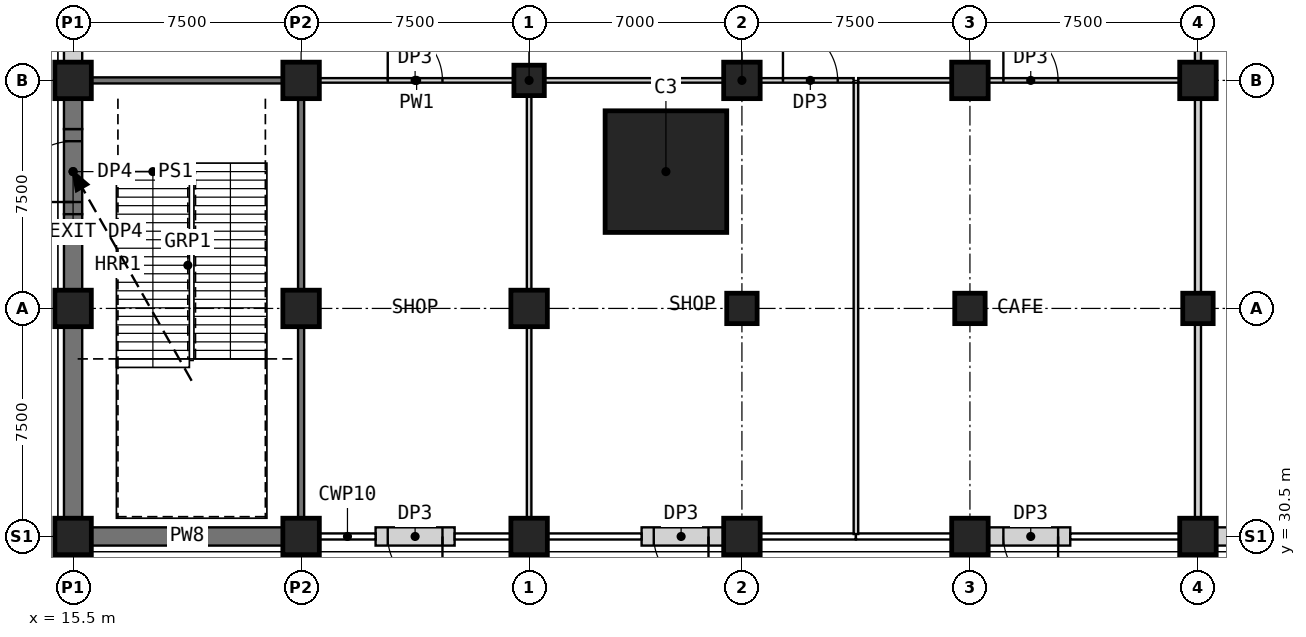
"""IFC4 building model, lengths in metres.
Left out: names, types, materials, properties, quantities, classifications, styles, units other than length and angle.
Written with IfcOpenShell. Run it as: python <this file> out.ifc"""

import sys

from ifc_helpers import new_model, si_unit, direction, frame, frame_2d, origin, origin_2d, place, context, subcontext, project, spatial, rectangle, extrude, element, fill, save


model = new_model("IFC4")
c1 = context("Model", 3, precision=1e-05, world=origin(), true_north=direction((0.0, 1.0)))
c2 = subcontext(c1, "Body", "Model", "MODEL_VIEW")
j1 = project(units=[si_unit("LENGTHUNIT", "METRE"), si_unit("PLANEANGLEUNIT", "RADIAN")], contexts=[c1])
p1 = place(None, origin())
s1 = spatial("IfcSite", under=j1, at=p1, CompositionType="ELEMENT")
p2 = place(p1, origin())
s2 = spatial("IfcBuilding", under=s1, at=p2, CompositionType="ELEMENT")
p3 = place(p2, origin())
s3 = spatial("IfcBuildingStorey", under=s2, at=p3, CompositionType="ELEMENT", Elevation=0.0)
for number, where, z_axis, x_axis in (
    (1, (30.5, 45.5, 0.0), (0.0, 0.0, 1.0), (1.0, 0.0, 0.0)),
    (2, (37.5, 38.0, 0.0), (0.0, 0.0, 1.0), (1.0, 0.0, 0.0)),
):
    element("IfcColumn", number, at=place(p3, frame(where, z_axis=z_axis, x_axis=x_axis)), inside=s3, PredefinedType="COLUMN", context=c2, shape_type="SweptSolid", body=[
        extrude(rectangle(XDim=1.0, YDim=1.0, at=origin_2d()), origin(), (0.0, 0.0, 1.0), 8.0),
    ])
p4 = place(p3, frame((37.5, 45.5, 0.0), z_axis=(0.0, 0.0, 1.0), x_axis=(1.0, 0.0, 0.0)))
e3 = element("IfcColumn", 3, at=p4, inside=s3, PredefinedType="COLUMN", context=c2, shape_type="SweptSolid", body=[
    extrude(rectangle(XDim=1.2, YDim=1.2, at=origin_2d()), origin(), (0.0, 0.0, 1.0), 8.0),
])
p5 = place(p3, frame((45.0, 38.0, 0.0), z_axis=(0.0, 0.0, 1.0), x_axis=(1.0, 0.0, 0.0)))
e4 = element("IfcColumn", 4, at=p5, inside=s3, PredefinedType="COLUMN", context=c2, shape_type="SweptSolid", body=[
    extrude(rectangle(XDim=1.0, YDim=1.0, at=origin_2d()), origin(), (0.0, 0.0, 1.0), 8.0),
])
p6 = place(p3, frame((45.0, 45.5, 0.0), z_axis=(0.0, 0.0, 1.0), x_axis=(1.0, 0.0, 0.0)))
e5 = element("IfcColumn", 5, at=p6, inside=s3, PredefinedType="COLUMN", context=c2, shape_type="SweptSolid", body=[
    extrude(rectangle(XDim=1.2, YDim=1.2, at=origin_2d()), origin(), (0.0, 0.0, 1.0), 8.0),
])
p7 = place(p3, frame((52.5, 38.0, 0.0), z_axis=(0.0, 0.0, 1.0), x_axis=(1.0, 0.0, 0.0)))
e6 = element("IfcColumn", 6, at=p7, inside=s3, PredefinedType="COLUMN", context=c2, shape_type="SweptSolid", body=[
    extrude(rectangle(XDim=1.0, YDim=1.0, at=origin_2d()), origin(), (0.0, 0.0, 1.0), 8.0),
])
p8 = place(p3, frame((52.5, 45.5, 0.0), z_axis=(0.0, 0.0, 1.0), x_axis=(1.0, 0.0, 0.0)))
e7 = element("IfcColumn", 7, at=p8, inside=s3, PredefinedType="COLUMN", context=c2, shape_type="SweptSolid", body=[
    extrude(rectangle(XDim=1.2, YDim=1.2, at=origin_2d()), origin(), (0.0, 0.0, 1.0), 8.0),
])
p9 = place(p3, frame((35.0, 42.5, 0.0), z_axis=(0.0, 0.0, 1.0), x_axis=(1.0, 0.0, 0.0)))
e8 = element("IfcColumn", 8, at=p9, inside=s3, PredefinedType="COLUMN", context=c2, shape_type="SweptSolid", body=[
    extrude(rectangle(XDim=4.0, YDim=4.0, at=origin_2d()), origin(), (0.0, 0.0, 1.0), 8.0),
])
for number, where, z_axis, x_axis in (
    (9, (15.5, 30.5, 0.0), (0.0, 0.0, 1.0), (1.0, 0.0, 0.0)),
    (10, (15.5, 38.0, 0.0), (0.0, 0.0, 1.0), (1.0, 0.0, 0.0)),
    (11, (15.5, 45.5, 0.0), (0.0, 0.0, 1.0), (1.0, 0.0, 0.0)),
    (12, (23.0, 30.5, 0.0), (0.0, 0.0, 1.0), (1.0, 0.0, 0.0)),
    (13, (23.0, 38.0, 0.0), (0.0, 0.0, 1.0), (1.0, 0.0, 0.0)),
    (14, (23.0, 45.5, 0.0), (0.0, 0.0, 1.0), (1.0, 0.0, 0.0)),
    (15, (30.5, 30.5, 0.0), (0.0, 0.0, 1.0), (1.0, 0.0, 0.0)),
    (16, (30.5, 38.0, 0.0), (0.0, 0.0, 1.0), (1.0, 0.0, 0.0)),
    (17, (37.5, 30.5, 0.0), (0.0, 0.0, 1.0), (1.0, 0.0, 0.0)),
    (18, (45.0, 30.5, 0.0), (0.0, 0.0, 1.0), (1.0, 0.0, 0.0)),
    (19, (52.5, 30.5, 0.0), (0.0, 0.0, 1.0), (1.0, 0.0, 0.0)),
):
    element("IfcColumn", number, at=place(p3, frame(where, z_axis=z_axis, x_axis=x_axis)), inside=s3, PredefinedType="COLUMN", context=c2, shape_type="SweptSolid", body=[
        extrude(rectangle(XDim=1.2, YDim=1.2, at=origin_2d()), origin(), (0.0, 0.0, 1.0), 8.0),
    ])
p10 = place(p3, frame((16.1, 30.5, 0.0), z_axis=(0.0, 0.0, 1.0), x_axis=(1.0, 0.0, 0.0)))
e20 = element("IfcWall", 20, at=p10, inside=s3, PredefinedType="PARTITIONING", context=c2, shape_type="SweptSolid", body=[
    extrude(rectangle(XDim=6.3, YDim=0.6, at=frame_2d((3.15, 0.0))), origin(), (0.0, 0.0, 1.0), 7.1),
])
p11 = place(p3, frame((28.05, 30.5, 0.0), z_axis=(0.0, 0.0, 1.0), x_axis=(-1.0, 0.0, 0.0)))
e21 = element("IfcWall", 21, at=p11, inside=s3, PredefinedType="PARTITIONING", context=c2, shape_type="SweptSolid", body=[
    extrude(rectangle(XDim=2.6, YDim=0.6, at=frame_2d((1.3, 0.0))), origin(), (0.0, 0.0, 1.0), 7.1),
])
p12 = place(p11, frame((0.4, 0.0, 0.0)))
e22 = element("IfcOpeningElement", 22, at=p12, cuts=e21, PredefinedType="OPENING", context=c2, shape_type="SweptSolid", body=[
    extrude(rectangle(XDim=1.8, YDim=2.4, at=frame_2d((0.9, 1.2))), frame((0.0, 0.31, 0.0), z_axis=(0.0, -1.0, 0.0), x_axis=(1.0, 0.0, 0.0)), (0.0, 0.0, 1.0), 0.62),
])
p13 = place(p3, frame((36.9, 30.5, 0.0), z_axis=(0.0, 0.0, 1.0), x_axis=(-1.0, 0.0, 0.0)))
e23 = element("IfcWall", 23, at=p13, inside=s3, PredefinedType="PARTITIONING", context=c2, shape_type="SweptSolid", body=[
    extrude(rectangle(XDim=2.7, YDim=0.6, at=frame_2d((1.35, 0.0))), origin(), (0.0, 0.0, 1.0), 7.1),
])
p14 = place(p13, frame((0.5, 0.0, 0.0)))
e24 = element("IfcOpeningElement", 24, at=p14, cuts=e23, PredefinedType="OPENING", context=c2, shape_type="SweptSolid", body=[
    extrude(rectangle(XDim=1.8, YDim=2.4, at=frame_2d((0.9, 1.2))), frame((0.0, 0.31, 0.0), z_axis=(0.0, -1.0, 0.0), x_axis=(1.0, 0.0, 0.0)), (0.0, 0.0, 1.0), 0.62),
])
p15 = place(p3, frame((48.3, 30.5, 0.0), z_axis=(0.0, 0.0, 1.0), x_axis=(-1.0, 0.0, 0.0)))
e25 = element("IfcWall", 25, at=p15, inside=s3, PredefinedType="PARTITIONING", context=c2, shape_type="SweptSolid", body=[
    extrude(rectangle(XDim=2.7, YDim=0.6, at=frame_2d((1.35, 0.0))), origin(), (0.0, 0.0, 1.0), 7.1),
])
p16 = place(p15, frame((0.4, 0.0, 0.0)))
e26 = element("IfcOpeningElement", 26, at=p16, cuts=e25, PredefinedType="OPENING", context=c2, shape_type="SweptSolid", body=[
    extrude(rectangle(XDim=1.8, YDim=2.4, at=frame_2d((0.9, 1.2))), frame((0.0, 0.31, 0.0), z_axis=(0.0, -1.0, 0.0), x_axis=(1.0, 0.0, 0.0)), (0.0, 0.0, 1.0), 0.62),
])
p17 = place(p3, frame((53.1, 30.5, 0.0), z_axis=(0.0, 0.0, 1.0), x_axis=(1.0, 0.0, 0.0)))
e27 = element("IfcWall", 27, at=p17, inside=s3, PredefinedType="PARTITIONING", context=c2, shape_type="SweptSolid", body=[
    extrude(rectangle(XDim=1.85, YDim=0.6, at=frame_2d((0.925, 0.0))), origin(), (0.0, 0.0, 1.0), 7.1),
])
p18 = place(p3, frame((16.1, 45.5, 0.0), z_axis=(0.0, 0.0, 1.0), x_axis=(1.0, 0.0, 0.0)))
e28 = element("IfcWall", 28, at=p18, inside=s3, PredefinedType="SHEAR", context=c2, shape_type="SweptSolid", body=[
    extrude(rectangle(XDim=6.3, YDim=0.2, at=frame_2d((3.15, 0.0))), origin(), (0.0, 0.0, 1.0), 7.7),
])
p19 = place(p3, frame((23.6, 45.5, 0.0), z_axis=(0.0, 0.0, 1.0), x_axis=(1.0, 0.0, 0.0)))
e29 = element("IfcWall", 29, at=p19, inside=s3, PredefinedType="PARTITIONING", context=c2, shape_type="SweptSolid", body=[
    extrude(rectangle(XDim=6.4, YDim=0.15, at=frame_2d((3.2, 0.0))), origin(), (0.0, 0.0, 1.0), 7.7),
])
p20 = place(p19, frame((2.25, 0.0, 0.0)))
e30 = element("IfcOpeningElement", 30, at=p20, cuts=e29, PredefinedType="OPENING", context=c2, shape_type="SweptSolid", body=[
    extrude(rectangle(XDim=1.8, YDim=2.4, at=frame_2d((0.9, 1.2))), frame((0.0, 0.085, 0.0), z_axis=(0.0, -1.0, 0.0), x_axis=(1.0, 0.0, 0.0)), (0.0, 0.0, 1.0), 0.17),
])
p21 = place(p3, frame((31.0, 45.5, 0.0), z_axis=(0.0, 0.0, 1.0), x_axis=(1.0, 0.0, 0.0)))
e31 = element("IfcWall", 31, at=p21, inside=s3, PredefinedType="PARTITIONING", context=c2, shape_type="SweptSolid", body=[
    extrude(rectangle(XDim=5.9, YDim=0.15, at=frame_2d((2.95, 0.0))), origin(), (0.0, 0.0, 1.0), 7.7),
])
p22 = place(p3, frame((38.1, 45.5, 0.0), z_axis=(0.0, 0.0, 1.0), x_axis=(1.0, 0.0, 0.0)))
e32 = element("IfcWall", 32, at=p22, inside=s3, PredefinedType="PARTITIONING", context=c2, shape_type="SweptSolid", body=[
    extrude(rectangle(XDim=3.075, YDim=0.15, at=frame_2d((1.538, 0.0))), origin(), (0.0, 0.0, 1.0), 7.7),
])
p23 = place(p22, frame((0.75, 0.0, 0.0)))
e33 = element("IfcOpeningElement", 33, at=p23, cuts=e32, PredefinedType="OPENING", context=c2, shape_type="SweptSolid", body=[
    extrude(rectangle(XDim=1.8, YDim=2.4, at=frame_2d((0.9, 1.2))), frame((0.0, 0.085, 0.0), z_axis=(0.0, -1.0, 0.0), x_axis=(1.0, 0.0, 0.0)), (0.0, 0.0, 1.0), 0.17),
])
p24 = place(p3, frame((41.325, 45.5, 0.0), z_axis=(0.0, 0.0, 1.0), x_axis=(1.0, 0.0, 0.0)))
e34 = element("IfcWall", 34, at=p24, inside=s3, PredefinedType="PARTITIONING", context=c2, shape_type="SweptSolid", body=[
    extrude(rectangle(XDim=3.075, YDim=0.15, at=frame_2d((1.538, 0.0))), origin(), (0.0, 0.0, 1.0), 7.7),
])
p25 = place(p3, frame((45.6, 45.5, 0.0), z_axis=(0.0, 0.0, 1.0), x_axis=(1.0, 0.0, 0.0)))
e35 = element("IfcWall", 35, at=p25, inside=s3, PredefinedType="PARTITIONING", context=c2, shape_type="SweptSolid", body=[
    extrude(rectangle(XDim=6.3, YDim=0.15, at=frame_2d((3.15, 0.0))), origin(), (0.0, 0.0, 1.0), 7.7),
])
p26 = place(p25, frame((0.5, 0.0, 0.0)))
e36 = element("IfcOpeningElement", 36, at=p26, cuts=e35, PredefinedType="OPENING", context=c2, shape_type="SweptSolid", body=[
    extrude(rectangle(XDim=1.8, YDim=2.4, at=frame_2d((0.9, 1.2))), frame((0.0, 0.085, 0.0), z_axis=(0.0, -1.0, 0.0), x_axis=(1.0, 0.0, 0.0)), (0.0, 0.0, 1.0), 0.17),
])
p27 = place(p3, frame((15.5, 31.1, 0.0), z_axis=(0.0, 0.0, 1.0), x_axis=(0.0, 1.0, 0.0)))
e37 = element("IfcWall", 37, at=p27, inside=s3, PredefinedType="PARTITIONING", context=c2, shape_type="SweptSolid", body=[
    extrude(rectangle(XDim=6.3, YDim=0.6, at=frame_2d((3.15, 0.0))), origin(), (0.0, 0.0, 1.0), 7.1),
])
p28 = place(p3, frame((15.5, 41.1, 0.0), z_axis=(0.0, 0.0, 1.0), x_axis=(0.0, 1.0, 0.0)))
e38 = element("IfcWall", 38, at=p28, inside=s3, PredefinedType="PARTITIONING", context=c2, shape_type="SweptSolid", body=[
    extrude(rectangle(XDim=2.8, YDim=0.6, at=frame_2d((1.4, 0.0))), origin(), (0.0, 0.0, 1.0), 7.1),
])
p29 = place(p28, frame((0.4, 0.0, 0.0)))
e39 = element("IfcOpeningElement", 39, at=p29, cuts=e38, PredefinedType="OPENING", context=c2, shape_type="SweptSolid", body=[
    extrude(rectangle(XDim=2.0, YDim=2.4, at=frame_2d((1.0, 1.2))), frame((0.0, 0.31, 0.0), z_axis=(0.0, -1.0, 0.0), x_axis=(1.0, 0.0, 0.0)), (0.0, 0.0, 1.0), 0.62),
])
p30 = place(p3, frame((15.5, 38.6, 0.0), z_axis=(0.0, 0.0, 1.0), x_axis=(0.0, 1.0, 0.0)))
e40 = element("IfcWall", 40, at=p30, inside=s3, PredefinedType="PARTITIONING", context=c2, shape_type="SweptSolid", body=[
    extrude(rectangle(XDim=2.5, YDim=0.6, at=frame_2d((1.25, 0.0))), origin(), (0.0, 0.0, 1.0), 7.1),
])
p31 = place(p3, frame((15.5, 43.9, 0.0), z_axis=(0.0, 0.0, 1.0), x_axis=(0.0, 1.0, 0.0)))
e41 = element("IfcWall", 41, at=p31, inside=s3, PredefinedType="PARTITIONING", context=c2, shape_type="SweptSolid", body=[
    extrude(rectangle(XDim=1.0, YDim=0.6, at=frame_2d((0.5, 0.0))), origin(), (0.0, 0.0, 1.0), 7.1),
])
p32 = place(p3, frame((15.5, 46.1, 0.0), z_axis=(0.0, 0.0, 1.0), x_axis=(0.0, 1.0, 0.0)))
e42 = element("IfcWall", 42, at=p32, inside=s3, PredefinedType="PARTITIONING", context=c2, shape_type="SweptSolid", body=[
    extrude(rectangle(XDim=1.6, YDim=0.6, at=frame_2d((0.8, 0.0))), origin(), (0.0, 0.0, 1.0), 7.1),
])
for number, where, z_axis, x_axis in (
    (43, (23.0, 31.1, 0.0), (0.0, 0.0, 1.0), (0.0, 1.0, 0.0)),
    (44, (23.0, 38.6, 0.0), (0.0, 0.0, 1.0), (0.0, 1.0, 0.0)),
):
    element("IfcWall", number, at=place(p3, frame(where, z_axis=z_axis, x_axis=x_axis)), inside=s3, PredefinedType="SHEAR", context=c2, shape_type="SweptSolid", body=[
        extrude(rectangle(XDim=6.3, YDim=0.2, at=frame_2d((3.15, 0.0))), origin(), (0.0, 0.0, 1.0), 7.7),
    ])
p33 = place(p3, frame((30.5, 31.1, 0.0), z_axis=(0.0, 0.0, 1.0), x_axis=(0.0, 1.0, 0.0)))
e45 = element("IfcWall", 45, at=p33, inside=s3, PredefinedType="PARTITIONING", context=c2, shape_type="SweptSolid", body=[
    extrude(rectangle(XDim=6.3, YDim=0.15, at=frame_2d((3.15, 0.0))), origin(), (0.0, 0.0, 1.0), 7.7),
])
p34 = place(p3, frame((30.5, 38.6, 0.0), z_axis=(0.0, 0.0, 1.0), x_axis=(0.0, 1.0, 0.0)))
e46 = element("IfcWall", 46, at=p34, inside=s3, PredefinedType="PARTITIONING", context=c2, shape_type="SweptSolid", body=[
    extrude(rectangle(XDim=6.4, YDim=0.15, at=frame_2d((3.2, 0.0))), origin(), (0.0, 0.0, 1.0), 7.7),
])
p35 = place(p3, frame((41.25, 30.58, 0.0), z_axis=(0.0, 0.0, 1.0), x_axis=(0.0, 1.0, 0.0)))
e47 = element("IfcWall", 47, at=p35, inside=s3, PredefinedType="PARTITIONING", context=c2, shape_type="SweptSolid", body=[
    extrude(rectangle(XDim=14.845, YDim=0.15, at=frame_2d((7.422, 0.0))), origin(), (0.0, 0.0, 1.0), 7.1),
])
for number, where, z_axis, x_axis in (
    (48, (52.5, 31.1, 0.0), (0.0, 0.0, 1.0), (0.0, 1.0, 0.0)),
    (49, (52.5, 38.5, 0.0), (0.0, 0.0, 1.0), (0.0, 1.0, 0.0)),
):
    element("IfcWall", number, at=place(p3, frame(where, z_axis=z_axis, x_axis=x_axis)), inside=s3, PredefinedType="PARTITIONING", context=c2, shape_type="SweptSolid", body=[
        extrude(rectangle(XDim=6.4, YDim=0.2, at=frame_2d((3.2, 0.0))), origin(), (0.0, 0.0, 1.0), 7.7),
    ])
p36 = place(p3, frame((52.5, 46.1, 0.0), z_axis=(0.0, 0.0, 1.0), x_axis=(0.0, 1.0, 0.0)))
e50 = element("IfcWall", 50, at=p36, inside=s3, PredefinedType="PARTITIONING", context=c2, shape_type="SweptSolid", body=[
    extrude(rectangle(XDim=5.8, YDim=0.2, at=frame_2d((2.9, 0.0))), origin(), (0.0, 0.0, 1.0), 7.7),
])
p37 = place(p12, origin())
e51 = element("IfcDoor", 51, at=p37, inside=s3, OperationType="SINGLE_SWING_LEFT", PredefinedType="DOOR", context=c2, shape_type="SweptSolid", body=[
    extrude(rectangle(XDim=1.8, YDim=2.4, at=frame_2d((0.9, 1.2))), frame((0.0, 0.025, 0.0), z_axis=(0.0, -1.0, 0.0), x_axis=(1.0, 0.0, 0.0)), (0.0, 0.0, 1.0), 0.05),
])
fill(e22, e51)
p38 = place(p14, origin())
e52 = element("IfcDoor", 52, at=p38, inside=s3, OperationType="SINGLE_SWING_LEFT", PredefinedType="DOOR", context=c2, shape_type="SweptSolid", body=[
    extrude(rectangle(XDim=1.8, YDim=2.4, at=frame_2d((0.9, 1.2))), frame((0.0, 0.025, 0.0), z_axis=(0.0, -1.0, 0.0), x_axis=(1.0, 0.0, 0.0)), (0.0, 0.0, 1.0), 0.05),
])
fill(e24, e52)
p39 = place(p16, origin())
e53 = element("IfcDoor", 53, at=p39, inside=s3, OperationType="SINGLE_SWING_LEFT", PredefinedType="DOOR", context=c2, shape_type="SweptSolid", body=[
    extrude(rectangle(XDim=1.8, YDim=2.4, at=frame_2d((0.9, 1.2))), frame((0.0, 0.025, 0.0), z_axis=(0.0, -1.0, 0.0), x_axis=(1.0, 0.0, 0.0)), (0.0, 0.0, 1.0), 0.05),
])
fill(e26, e53)
p40 = place(p20, origin())
e54 = element("IfcDoor", 54, at=p40, inside=s3, OperationType="SINGLE_SWING_LEFT", PredefinedType="DOOR", context=c2, shape_type="SweptSolid", body=[
    extrude(rectangle(XDim=1.8, YDim=2.4, at=frame_2d((0.9, 1.2))), frame((0.0, 0.025, 0.0), z_axis=(0.0, -1.0, 0.0), x_axis=(1.0, 0.0, 0.0)), (0.0, 0.0, 1.0), 0.05),
])
fill(e30, e54)
p41 = place(p23, origin())
e55 = element("IfcDoor", 55, at=p41, inside=s3, OperationType="SINGLE_SWING_LEFT", PredefinedType="DOOR", context=c2, shape_type="SweptSolid", body=[
    extrude(rectangle(XDim=1.8, YDim=2.4, at=frame_2d((0.9, 1.2))), frame((0.0, 0.025, 0.0), z_axis=(0.0, -1.0, 0.0), x_axis=(1.0, 0.0, 0.0)), (0.0, 0.0, 1.0), 0.05),
])
fill(e33, e55)
p42 = place(p26, origin())
e56 = element("IfcDoor", 56, at=p42, inside=s3, OperationType="SINGLE_SWING_LEFT", PredefinedType="DOOR", context=c2, shape_type="SweptSolid", body=[
    extrude(rectangle(XDim=1.8, YDim=2.4, at=frame_2d((0.9, 1.2))), frame((0.0, 0.025, 0.0), z_axis=(0.0, -1.0, 0.0), x_axis=(1.0, 0.0, 0.0)), (0.0, 0.0, 1.0), 0.05),
])
fill(e36, e56)
p43 = place(p29, origin())
e57 = element("IfcDoor", 57, at=p43, inside=s3, OperationType="SINGLE_SWING_LEFT", PredefinedType="DOOR", context=c2, shape_type="SweptSolid", body=[
    extrude(rectangle(XDim=2.0, YDim=2.4, at=frame_2d((1.0, 1.2))), frame((0.0, 0.025, 0.0), z_axis=(0.0, -1.0, 0.0), x_axis=(1.0, 0.0, 0.0)), (0.0, 0.0, 1.0), 0.05),
])
fill(e39, e57)
save(model, sys.argv[1])
